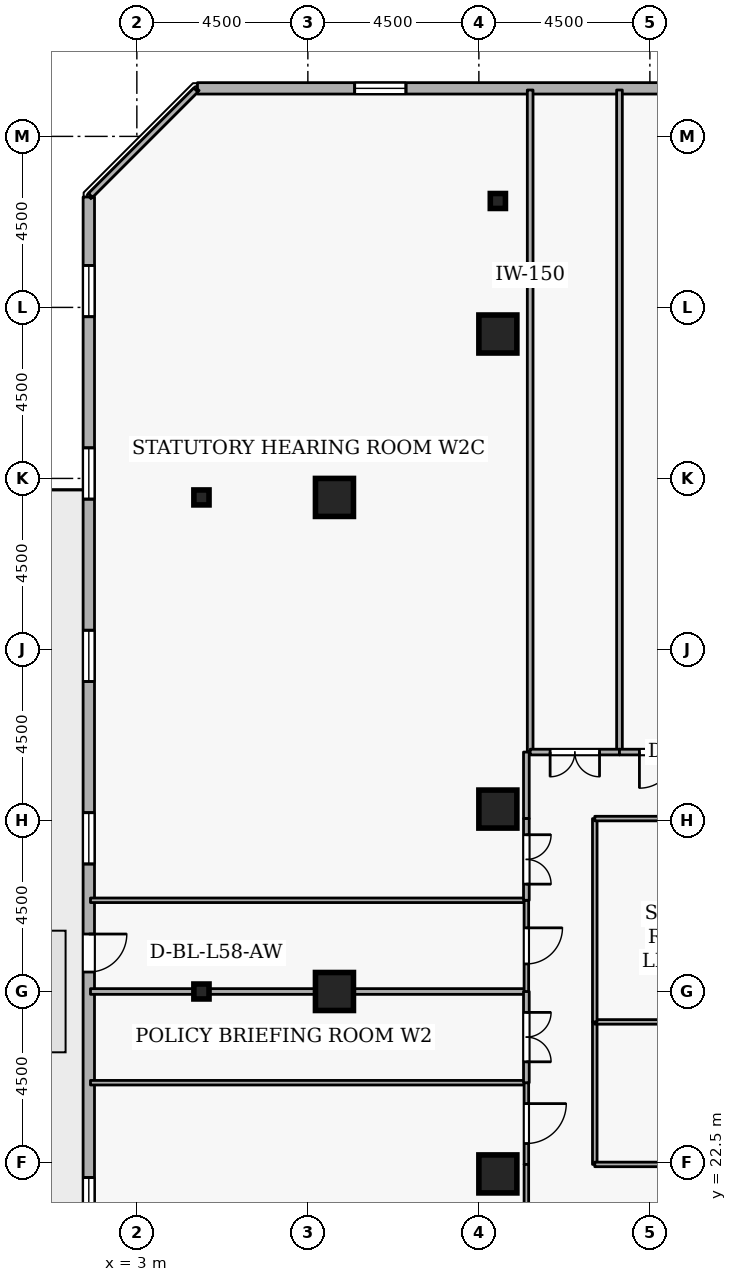
"""IFC4 building model, lengths in metres.
Left out: names, types, materials, properties, quantities, classifications, styles, units other than length and angle.
Written with IfcOpenShell. Run it as: python <this file> out.ifc"""

import sys

from ifc_helpers import new_model, si_unit, direction, frame, frame_2d, origin, origin_2d, place, context, subcontext, project, spatial, rectangle, i_section, extrude, element, fill, save


model = new_model("IFC4")
c1 = context("Model", 3, precision=1e-05, world=origin(), true_north=direction((0.0, 1.0)))
c2 = subcontext(c1, "Body", "Model", "MODEL_VIEW")
j1 = project(units=[si_unit("LENGTHUNIT", "METRE"), si_unit("PLANEANGLEUNIT", "RADIAN")], contexts=[c1])
p1 = place(None, origin())
s1 = spatial("IfcSite", under=j1, at=p1, CompositionType="ELEMENT")
p2 = place(p1, origin())
s2 = spatial("IfcBuilding", under=s1, at=p2, CompositionType="ELEMENT")
p3 = place(p2, frame((0.0, 0.0, 218.1)))
s3 = spatial("IfcBuildingStorey", under=s2, at=p3, CompositionType="ELEMENT", Elevation=218.1)
for number, where, z_axis, x_axis in (
    (1, (12.5, 44.3, 0.0), (0.0, 0.0, 1.0), (1.0, 0.0, 0.0)),
    (2, (8.2, 27.0, 0.0), (0.0, 0.0, 1.0), (1.0, 0.0, 0.0)),
    (3, (8.2, 40.0, 0.0), (0.0, 0.0, 1.0), (1.0, 0.0, 0.0)),
    (4, (12.5, 22.2, 0.0), (0.0, 0.0, 1.0), (1.0, 0.0, 0.0)),
    (5, (12.5, 31.8, 0.0), (0.0, 0.0, 1.0), (1.0, 0.0, 0.0)),
):
    element("IfcColumn", number, at=place(p3, frame(where, z_axis=z_axis, x_axis=x_axis)), inside=s3, PredefinedType="COLUMN", context=c2, shape_type="SweptSolid", body=[
        extrude(rectangle(XDim=1.0, YDim=1.0, at=origin_2d()), origin(), (0.0, 0.0, 1.0), 3.6),
    ])
for number, where, z_axis, x_axis in (
    (6, (12.5, 47.8, 0.0), (0.0, 0.0, 1.0), (1.0, 0.0, 0.0)),
    (7, (4.7, 27.0, 0.0), (0.0, 0.0, 1.0), (1.0, 0.0, 0.0)),
    (8, (4.7, 40.0, 0.0), (0.0, 0.0, 1.0), (1.0, 0.0, 0.0)),
):
    element("IfcColumn", number, at=place(p3, frame(where, z_axis=z_axis, x_axis=x_axis)), inside=s3, PredefinedType="COLUMN", context=c2, shape_type="SweptSolid", body=[
        extrude(i_section(OverallWidth=0.399, OverallDepth=0.394, WebThickness=0.023, FlangeThickness=0.037, FilletRadius=0.015, at=origin_2d()), origin(), (0.0, 0.0, 1.0), 3.6),
    ])
p4 = place(p3, frame((40.681, 50.765, 0.0), z_axis=(0.0, 0.0, 1.0), x_axis=(-0.999999999634, -2.7061402e-05, 0.0)))
e9 = element("IfcWall", 9, at=p4, inside=s3, PredefinedType="STANDARD", context=c2, shape_type="SweptSolid", body=[
    extrude(rectangle(XDim=36.087, YDim=0.3, at=frame_2d((18.043, 0.0))), origin(), (0.0, 0.0, 1.0), 2.66),
])
p5 = place(p4, frame((1.8, 0.0, 0.72)))
e10 = element("IfcOpeningElement", 10, at=p5, cuts=e9, PredefinedType="OPENING", context=c2, shape_type="SweptSolid", body=[
    extrude(rectangle(XDim=1.35, YDim=1.05, at=frame_2d((0.675, 0.525))), frame((0.0, 0.16, 0.0), z_axis=(0.0, -1.0, 0.0), x_axis=(1.0, 0.0, 0.0)), (0.0, 0.0, 1.0), 0.32),
])
p6 = place(p4, frame((6.6, 0.0, 0.72)))
e11 = element("IfcOpeningElement", 11, at=p6, cuts=e9, PredefinedType="OPENING", context=c2, shape_type="SweptSolid", body=[
    extrude(rectangle(XDim=1.35, YDim=1.05, at=frame_2d((0.675, 0.525))), frame((0.0, 0.16, 0.0), z_axis=(0.0, -1.0, 0.0), x_axis=(1.0, 0.0, 0.0)), (0.0, 0.0, 1.0), 0.32),
])
p7 = place(p4, frame((11.4, 0.0, 0.72)))
e12 = element("IfcOpeningElement", 12, at=p7, cuts=e9, PredefinedType="OPENING", context=c2, shape_type="SweptSolid", body=[
    extrude(rectangle(XDim=1.35, YDim=1.05, at=frame_2d((0.675, 0.525))), frame((0.0, 0.16, 0.0), z_axis=(0.0, -1.0, 0.0), x_axis=(1.0, 0.0, 0.0)), (0.0, 0.0, 1.0), 0.32),
])
p8 = place(p4, frame((16.2, 0.0, 0.72)))
e13 = element("IfcOpeningElement", 13, at=p8, cuts=e9, PredefinedType="OPENING", context=c2, shape_type="SweptSolid", body=[
    extrude(rectangle(XDim=1.35, YDim=1.05, at=frame_2d((0.675, 0.525))), frame((0.0, 0.16, 0.0), z_axis=(0.0, -1.0, 0.0), x_axis=(1.0, 0.0, 0.0)), (0.0, 0.0, 1.0), 0.32),
])
p9 = place(p4, frame((21.0, 0.0, 0.72)))
e14 = element("IfcOpeningElement", 14, at=p9, cuts=e9, PredefinedType="OPENING", context=c2, shape_type="SweptSolid", body=[
    extrude(rectangle(XDim=1.35, YDim=1.05, at=frame_2d((0.675, 0.525))), frame((0.0, 0.16, 0.0), z_axis=(0.0, -1.0, 0.0), x_axis=(1.0, 0.0, 0.0)), (0.0, 0.0, 1.0), 0.32),
])
p10 = place(p4, frame((30.6, 0.0, 0.72)))
e15 = element("IfcOpeningElement", 15, at=p10, cuts=e9, PredefinedType="OPENING", context=c2, shape_type="SweptSolid", body=[
    extrude(rectangle(XDim=1.35, YDim=1.05, at=frame_2d((0.675, 0.525))), frame((0.0, 0.16, 0.0), z_axis=(0.0, -1.0, 0.0), x_axis=(1.0, 0.0, 0.0)), (0.0, 0.0, 1.0), 0.32),
])
p11 = place(p3, frame((1.736, 47.906, 0.0), z_axis=(0.0, 0.0, 1.0), x_axis=(-2.7061402e-05, -0.999999999634, 0.0)))
e16 = element("IfcWall", 16, at=p11, inside=s3, PredefinedType="STANDARD", context=c2, shape_type="SweptSolid", body=[
    extrude(rectangle(XDim=36.087, YDim=0.3, at=frame_2d((18.043, 0.0))), origin(), (0.0, 0.0, 1.0), 2.66),
])
p12 = place(p11, frame((19.393, 0.0, 0.0)))
e17 = element("IfcOpeningElement", 17, at=p12, cuts=e16, PredefinedType="OPENING", context=c2, shape_type="SweptSolid", body=[
    extrude(rectangle(XDim=1.0, YDim=2.08, at=frame_2d((0.5, 1.04))), frame((0.0, 0.16, 0.0), z_axis=(0.0, -1.0, 0.0), x_axis=(1.0, 0.0, 0.0)), (0.0, 0.0, 1.0), 0.32),
])
p13 = place(p11, frame((1.8, 0.0, 0.72)))
e18 = element("IfcOpeningElement", 18, at=p13, cuts=e16, PredefinedType="OPENING", context=c2, shape_type="SweptSolid", body=[
    extrude(rectangle(XDim=1.35, YDim=1.05, at=frame_2d((0.675, 0.525))), frame((0.0, 0.16, 0.0), z_axis=(0.0, -1.0, 0.0), x_axis=(1.0, 0.0, 0.0)), (0.0, 0.0, 1.0), 0.32),
])
p14 = place(p11, frame((6.6, 0.0, 0.72)))
e19 = element("IfcOpeningElement", 19, at=p14, cuts=e16, PredefinedType="OPENING", context=c2, shape_type="SweptSolid", body=[
    extrude(rectangle(XDim=1.35, YDim=1.05, at=frame_2d((0.675, 0.525))), frame((0.0, 0.16, 0.0), z_axis=(0.0, -1.0, 0.0), x_axis=(1.0, 0.0, 0.0)), (0.0, 0.0, 1.0), 0.32),
])
p15 = place(p11, frame((11.4, 0.0, 0.72)))
e20 = element("IfcOpeningElement", 20, at=p15, cuts=e16, PredefinedType="OPENING", context=c2, shape_type="SweptSolid", body=[
    extrude(rectangle(XDim=1.35, YDim=1.05, at=frame_2d((0.675, 0.525))), frame((0.0, 0.16, 0.0), z_axis=(0.0, -1.0, 0.0), x_axis=(1.0, 0.0, 0.0)), (0.0, 0.0, 1.0), 0.32),
])
p16 = place(p11, frame((16.2, 0.0, 0.72)))
e21 = element("IfcOpeningElement", 21, at=p16, cuts=e16, PredefinedType="OPENING", context=c2, shape_type="SweptSolid", body=[
    extrude(rectangle(XDim=1.35, YDim=1.05, at=frame_2d((0.675, 0.525))), frame((0.0, 0.16, 0.0), z_axis=(0.0, -1.0, 0.0), x_axis=(1.0, 0.0, 0.0)), (0.0, 0.0, 1.0), 0.32),
])
p17 = place(p11, frame((25.8, 0.0, 0.72)))
e22 = element("IfcOpeningElement", 22, at=p17, cuts=e16, PredefinedType="OPENING", context=c2, shape_type="SweptSolid", body=[
    extrude(rectangle(XDim=1.35, YDim=1.05, at=frame_2d((0.675, 0.525))), frame((0.0, 0.16, 0.0), z_axis=(0.0, -1.0, 0.0), x_axis=(1.0, 0.0, 0.0)), (0.0, 0.0, 1.0), 0.32),
])
p18 = place(p11, frame((30.6, 0.0, 0.72)))
e23 = element("IfcOpeningElement", 23, at=p18, cuts=e16, PredefinedType="OPENING", context=c2, shape_type="SweptSolid", body=[
    extrude(rectangle(XDim=1.35, YDim=1.05, at=frame_2d((0.675, 0.525))), frame((0.0, 0.16, 0.0), z_axis=(0.0, -1.0, 0.0), x_axis=(1.0, 0.0, 0.0)), (0.0, 0.0, 1.0), 0.32),
])
for number, where, z_axis, x_axis in (
    (24, (13.35, 33.3, 0.0), (0.0, 0.0, 1.0), (0.0, 1.0, 0.0)),
    (25, (15.7, 50.72, 0.0), (0.0, 0.0, 1.0), (0.0, -1.0, 0.0)),
):
    element("IfcWall", number, at=place(p3, frame(where, z_axis=z_axis, x_axis=x_axis)), inside=s3, PredefinedType="PARTITIONING", context=c2, shape_type="SweptSolid", body=[
        extrude(rectangle(XDim=17.42, YDim=0.15, at=frame_2d((8.71, 0.0))), origin(), (0.0, 0.0, 1.0), 3.26),
    ])
p19 = place(p3, frame((15.7, 33.3, 0.0), z_axis=(0.0, 0.0, 1.0), x_axis=(-1.0, 0.0, 0.0)))
e26 = element("IfcWall", 26, at=p19, inside=s3, PredefinedType="PARTITIONING", context=c2, shape_type="SweptSolid", body=[
    extrude(rectangle(XDim=2.35, YDim=0.15, at=frame_2d((1.175, 0.0))), origin(), (0.0, 0.0, 1.0), 3.26),
])
p20 = place(p19, frame((0.525, 0.0, 0.0)))
e27 = element("IfcOpeningElement", 27, at=p20, cuts=e26, PredefinedType="OPENING", context=c2, shape_type="SweptSolid", body=[
    extrude(rectangle(XDim=1.3, YDim=2.12, at=frame_2d((0.65, 1.06))), frame((0.0, 0.085, 0.0), z_axis=(0.0, -1.0, 0.0), x_axis=(1.0, 0.0, 0.0)), (0.0, 0.0, 1.0), 0.17),
])
p21 = place(p3, frame((17.7, 33.3, 0.0), z_axis=(0.0, 0.0, 1.0), x_axis=(-1.0, 0.0, 0.0)))
e28 = element("IfcWall", 28, at=p21, inside=s3, PredefinedType="PARTITIONING", context=c2, shape_type="SweptSolid", body=[
    extrude(rectangle(XDim=2.0, YDim=0.15, at=frame_2d((1.0, 0.0))), origin(), (0.0, 0.0, 1.0), 3.26),
])
p22 = place(p21, frame((0.525, 0.0, 0.0)))
e29 = element("IfcOpeningElement", 29, at=p22, cuts=e28, PredefinedType="OPENING", context=c2, shape_type="SweptSolid", body=[
    extrude(rectangle(XDim=0.95, YDim=2.1, at=frame_2d((0.475, 1.05))), frame((0.0, 0.085, 0.0), z_axis=(0.0, -1.0, 0.0), x_axis=(1.0, 0.0, 0.0)), (0.0, 0.0, 1.0), 0.17),
])
p23 = place(p3, frame((1.78, 24.6, 0.0), z_axis=(0.0, 0.0, 1.0), x_axis=(1.0, 0.0, 0.0)))
e30 = element("IfcWall", 30, at=p23, inside=s3, PredefinedType="PARTITIONING", context=c2, shape_type="SweptSolid", body=[
    extrude(rectangle(XDim=11.47, YDim=0.12, at=frame_2d((5.735, 0.0))), origin(), (0.0, 0.0, 1.0), 3.26),
])
p24 = place(p3, frame((13.25, 24.6, 0.0), z_axis=(0.0, 0.0, 1.0), x_axis=(0.0, -1.0, 0.0)))
e31 = element("IfcWall", 31, at=p24, inside=s3, PredefinedType="PARTITIONING", context=c2, shape_type="SweptSolid", body=[
    extrude(rectangle(XDim=2.15, YDim=0.12, at=frame_2d((1.075, 0.0))), origin(), (0.0, 0.0, 1.0), 3.26),
])
p25 = place(p24, frame((0.55, 0.0, 0.0)))
e32 = element("IfcOpeningElement", 32, at=p25, cuts=e31, PredefinedType="OPENING", context=c2, shape_type="SweptSolid", body=[
    extrude(rectangle(XDim=1.05, YDim=2.1, at=frame_2d((0.525, 1.05))), frame((0.0, 0.07, 0.0), z_axis=(0.0, -1.0, 0.0), x_axis=(1.0, 0.0, 0.0)), (0.0, 0.0, 1.0), 0.14),
])
p26 = place(p3, frame((13.25, 22.45, 0.0), z_axis=(0.0, 0.0, 1.0), x_axis=(0.0, -1.0, 0.0)))
e33 = element("IfcWall", 33, at=p26, inside=s3, PredefinedType="PARTITIONING", context=c2, shape_type="SweptSolid", body=[
    extrude(rectangle(XDim=1.75, YDim=0.12, at=frame_2d((0.875, 0.0))), origin(), (0.0, 0.0, 1.0), 3.26),
])
p27 = place(p3, frame((1.78, 27.0, 0.0), z_axis=(0.0, 0.0, 1.0), x_axis=(1.0, 0.0, 0.0)))
e34 = element("IfcWall", 34, at=p27, inside=s3, PredefinedType="PARTITIONING", context=c2, shape_type="SweptSolid", body=[
    extrude(rectangle(XDim=11.47, YDim=0.15, at=frame_2d((5.735, 0.0))), origin(), (0.0, 0.0, 1.0), 2.802),
])
p28 = place(p3, frame((13.25, 27.0, 0.0), z_axis=(0.0, 0.0, 1.0), x_axis=(0.0, -1.0, 0.0)))
e35 = element("IfcWall", 35, at=p28, inside=s3, PredefinedType="PARTITIONING", context=c2, shape_type="SweptSolid", body=[
    extrude(rectangle(XDim=2.4, YDim=0.15, at=frame_2d((1.2, 0.0))), origin(), (0.0, 0.0, 1.0), 3.26),
])
p29 = place(p28, frame((0.55, 0.0, 0.0)))
e36 = element("IfcOpeningElement", 36, at=p29, cuts=e35, PredefinedType="OPENING", context=c2, shape_type="SweptSolid", body=[
    extrude(rectangle(XDim=1.3, YDim=2.12, at=frame_2d((0.65, 1.06))), frame((0.0, 0.085, 0.0), z_axis=(0.0, -1.0, 0.0), x_axis=(1.0, 0.0, 0.0)), (0.0, 0.0, 1.0), 0.17),
])
p30 = place(p3, frame((1.78, 29.4, 0.0), z_axis=(0.0, 0.0, 1.0), x_axis=(1.0, 0.0, 0.0)))
e37 = element("IfcWall", 37, at=p30, inside=s3, PredefinedType="PARTITIONING", context=c2, shape_type="SweptSolid", body=[
    extrude(rectangle(XDim=11.47, YDim=0.12, at=frame_2d((5.735, 0.0))), origin(), (0.0, 0.0, 1.0), 3.26),
])
p31 = place(p3, frame((13.25, 29.4, 0.0), z_axis=(0.0, 0.0, 1.0), x_axis=(0.0, -1.0, 0.0)))
e38 = element("IfcWall", 38, at=p31, inside=s3, PredefinedType="PARTITIONING", context=c2, shape_type="SweptSolid", body=[
    extrude(rectangle(XDim=2.4, YDim=0.12, at=frame_2d((1.2, 0.0))), origin(), (0.0, 0.0, 1.0), 3.26),
])
p32 = place(p31, frame((0.725, 0.0, 0.0)))
e39 = element("IfcOpeningElement", 39, at=p32, cuts=e38, PredefinedType="OPENING", context=c2, shape_type="SweptSolid", body=[
    extrude(rectangle(XDim=0.95, YDim=2.1, at=frame_2d((0.475, 1.05))), frame((0.0, 0.07, 0.0), z_axis=(0.0, -1.0, 0.0), x_axis=(1.0, 0.0, 0.0)), (0.0, 0.0, 1.0), 0.14),
])
p33 = place(p3, frame((1.78, 47.948, 0.0), z_axis=(0.0, 0.0, 1.0), x_axis=(0.707106781187, 0.707106781187, 0.0)))
e40 = element("IfcWall", 40, at=p33, inside=s3, PredefinedType="PARTITIONING", context=c2, shape_type="SweptSolid", body=[
    extrude(rectangle(XDim=3.919, YDim=0.15, at=frame_2d((1.96, 0.0))), origin(), (0.0, 0.0, 1.0), 3.26),
])
p34 = place(p3, frame((13.25, 33.3, 0.0), z_axis=(0.0, 0.0, 1.0), x_axis=(0.0, -1.0, 0.0)))
e41 = element("IfcWall", 41, at=p34, inside=s3, PredefinedType="PARTITIONING", context=c2, shape_type="SweptSolid", body=[
    extrude(rectangle(XDim=1.75, YDim=0.15, at=frame_2d((0.875, 0.0))), origin(), (0.0, 0.0, 1.0), 3.26),
])
p35 = place(p3, frame((13.25, 31.55, 0.0), z_axis=(0.0, 0.0, 1.0), x_axis=(0.0, -1.0, 0.0)))
e42 = element("IfcWall", 42, at=p35, inside=s3, PredefinedType="PARTITIONING", context=c2, shape_type="SweptSolid", body=[
    extrude(rectangle(XDim=2.15, YDim=0.15, at=frame_2d((1.075, 0.0))), origin(), (0.0, 0.0, 1.0), 3.26),
])
p36 = place(p35, frame((0.425, 0.0, 0.0)))
e43 = element("IfcOpeningElement", 43, at=p36, cuts=e42, PredefinedType="OPENING", context=c2, shape_type="SweptSolid", body=[
    extrude(rectangle(XDim=1.3, YDim=2.12, at=frame_2d((0.65, 1.06))), frame((0.0, 0.085, 0.0), z_axis=(0.0, -1.0, 0.0), x_axis=(1.0, 0.0, 0.0)), (0.0, 0.0, 1.0), 0.17),
])
p37 = place(p3, frame((15.05, 22.45, 0.0), z_axis=(0.0, 0.0, 1.0), x_axis=(0.0, 1.0, 0.0)))
e44 = element("IfcWall", 44, at=p37, inside=s3, PredefinedType="PARTITIONING", context=c2, shape_type="SweptSolid", body=[
    extrude(rectangle(XDim=3.75, YDim=0.12, at=frame_2d((1.875, 0.0))), origin(), (0.0, 0.0, 1.0), 3.26),
])
p38 = place(p3, frame((15.05, 26.2, 0.0), z_axis=(0.0, 0.0, 1.0), x_axis=(1.0, 0.0, 0.0)))
e45 = element("IfcWall", 45, at=p38, inside=s3, PredefinedType="PARTITIONING", context=c2, shape_type="SweptSolid", body=[
    extrude(rectangle(XDim=5.85, YDim=0.12, at=frame_2d((2.925, 0.0))), origin(), (0.0, 0.0, 1.0), 3.26),
])
p39 = place(p3, frame((20.9, 22.45, 0.0), z_axis=(0.0, 0.0, 1.0), x_axis=(-1.0, 0.0, 0.0)))
e46 = element("IfcWall", 46, at=p39, inside=s3, PredefinedType="PARTITIONING", context=c2, shape_type="SweptSolid", body=[
    extrude(rectangle(XDim=5.85, YDim=0.12, at=frame_2d((2.925, 0.0))), origin(), (0.0, 0.0, 1.0), 3.26),
])
p40 = place(p39, frame((2.45, 0.0, 0.0)))
e47 = element("IfcOpeningElement", 47, at=p40, cuts=e46, PredefinedType="OPENING", context=c2, shape_type="SweptSolid", body=[
    extrude(rectangle(XDim=0.95, YDim=2.1, at=frame_2d((0.475, 1.05))), frame((0.0, 0.07, 0.0), z_axis=(0.0, -1.0, 0.0), x_axis=(1.0, 0.0, 0.0)), (0.0, 0.0, 1.0), 0.14),
])
p41 = place(p3, frame((15.05, 26.2, 0.0), z_axis=(0.0, 0.0, 1.0), x_axis=(0.0, 1.0, 0.0)))
e48 = element("IfcWall", 48, at=p41, inside=s3, PredefinedType="PARTITIONING", context=c2, shape_type="SweptSolid", body=[
    extrude(rectangle(XDim=5.35, YDim=0.12, at=frame_2d((2.675, 0.0))), origin(), (0.0, 0.0, 1.0), 3.26),
])
p42 = place(p3, frame((15.05, 31.55, 0.0), z_axis=(0.0, 0.0, 1.0), x_axis=(1.0, 0.0, 0.0)))
e49 = element("IfcWall", 49, at=p42, inside=s3, PredefinedType="PARTITIONING", context=c2, shape_type="SweptSolid", body=[
    extrude(rectangle(XDim=5.85, YDim=0.12, at=frame_2d((2.925, 0.0))), origin(), (0.0, 0.0, 1.0), 3.26),
])
p43 = place(p42, frame((2.45, 0.0, 0.0)))
e50 = element("IfcOpeningElement", 50, at=p43, cuts=e49, PredefinedType="OPENING", context=c2, shape_type="SweptSolid", body=[
    extrude(rectangle(XDim=0.95, YDim=2.1, at=frame_2d((0.475, 1.05))), frame((0.0, 0.07, 0.0), z_axis=(0.0, -1.0, 0.0), x_axis=(1.0, 0.0, 0.0)), (0.0, 0.0, 1.0), 0.14),
])
p44 = place(p10, origin())
e51 = element("IfcWindow", 51, at=p44, inside=s3, PartitioningType="SINGLE_PANEL", PredefinedType="WINDOW", context=c2, shape_type="SweptSolid", body=[
    extrude(rectangle(XDim=1.35, YDim=1.05, at=frame_2d((0.675, 0.525))), frame((0.0, 0.03, 0.0), z_axis=(0.0, -1.0, 0.0), x_axis=(1.0, 0.0, 0.0)), (0.0, 0.0, 1.0), 0.06),
])
fill(e15, e51)
p45 = place(p12, origin())
e52 = element("IfcDoor", 52, at=p45, inside=s3, OperationType="SINGLE_SWING_LEFT", PredefinedType="DOOR", context=c2, shape_type="SweptSolid", body=[
    extrude(rectangle(XDim=1.0, YDim=2.08, at=frame_2d((0.5, 1.04))), frame((0.0, 0.025, 0.0), z_axis=(0.0, -1.0, 0.0), x_axis=(1.0, 0.0, 0.0)), (0.0, 0.0, 1.0), 0.05),
])
fill(e17, e52)
p46 = place(p13, origin())
e53 = element("IfcWindow", 53, at=p46, inside=s3, PartitioningType="SINGLE_PANEL", PredefinedType="WINDOW", context=c2, shape_type="SweptSolid", body=[
    extrude(rectangle(XDim=1.35, YDim=1.05, at=frame_2d((0.675, 0.525))), frame((0.0, 0.03, 0.0), z_axis=(0.0, -1.0, 0.0), x_axis=(1.0, 0.0, 0.0)), (0.0, 0.0, 1.0), 0.06),
])
fill(e18, e53)
p47 = place(p14, origin())
e54 = element("IfcWindow", 54, at=p47, inside=s3, PartitioningType="SINGLE_PANEL", PredefinedType="WINDOW", context=c2, shape_type="SweptSolid", body=[
    extrude(rectangle(XDim=1.35, YDim=1.05, at=frame_2d((0.675, 0.525))), frame((0.0, 0.03, 0.0), z_axis=(0.0, -1.0, 0.0), x_axis=(1.0, 0.0, 0.0)), (0.0, 0.0, 1.0), 0.06),
])
fill(e19, e54)
p48 = place(p15, origin())
e55 = element("IfcWindow", 55, at=p48, inside=s3, PartitioningType="SINGLE_PANEL", PredefinedType="WINDOW", context=c2, shape_type="SweptSolid", body=[
    extrude(rectangle(XDim=1.35, YDim=1.05, at=frame_2d((0.675, 0.525))), frame((0.0, 0.03, 0.0), z_axis=(0.0, -1.0, 0.0), x_axis=(1.0, 0.0, 0.0)), (0.0, 0.0, 1.0), 0.06),
])
fill(e20, e55)
p49 = place(p16, origin())
e56 = element("IfcWindow", 56, at=p49, inside=s3, PartitioningType="SINGLE_PANEL", PredefinedType="WINDOW", context=c2, shape_type="SweptSolid", body=[
    extrude(rectangle(XDim=1.35, YDim=1.05, at=frame_2d((0.675, 0.525))), frame((0.0, 0.03, 0.0), z_axis=(0.0, -1.0, 0.0), x_axis=(1.0, 0.0, 0.0)), (0.0, 0.0, 1.0), 0.06),
])
fill(e21, e56)
p50 = place(p17, origin())
e57 = element("IfcWindow", 57, at=p50, inside=s3, PartitioningType="SINGLE_PANEL", PredefinedType="WINDOW", context=c2, shape_type="SweptSolid", body=[
    extrude(rectangle(XDim=1.35, YDim=1.05, at=frame_2d((0.675, 0.525))), frame((0.0, 0.03, 0.0), z_axis=(0.0, -1.0, 0.0), x_axis=(1.0, 0.0, 0.0)), (0.0, 0.0, 1.0), 0.06),
])
fill(e22, e57)
p51 = place(p20, origin())
e58 = element("IfcDoor", 58, at=p51, inside=s3, OperationType="DOUBLE_DOOR_SINGLE_SWING", PredefinedType="DOOR", context=c2, shape_type="SweptSolid", body=[
    extrude(rectangle(XDim=1.3, YDim=2.12, at=frame_2d((0.65, 1.06))), frame((0.0, 0.025, 0.0), z_axis=(0.0, -1.0, 0.0), x_axis=(1.0, 0.0, 0.0)), (0.0, 0.0, 1.0), 0.05),
])
fill(e27, e58)
p52 = place(p22, origin())
e59 = element("IfcDoor", 59, at=p52, inside=s3, OperationType="SINGLE_SWING_RIGHT", PredefinedType="DOOR", context=c2, shape_type="SweptSolid", body=[
    extrude(rectangle(XDim=0.95, YDim=2.1, at=frame_2d((0.475, 1.05))), frame((0.0, 0.025, 0.0), z_axis=(0.0, -1.0, 0.0), x_axis=(1.0, 0.0, 0.0)), (0.0, 0.0, 1.0), 0.05),
])
fill(e29, e59)
p53 = place(p25, origin())
e60 = element("IfcDoor", 60, at=p53, inside=s3, OperationType="SINGLE_SWING_LEFT", PredefinedType="DOOR", context=c2, shape_type="SweptSolid", body=[
    extrude(rectangle(XDim=1.05, YDim=2.1, at=frame_2d((0.525, 1.05))), frame((0.0, 0.025, 0.0), z_axis=(0.0, -1.0, 0.0), x_axis=(1.0, 0.0, 0.0)), (0.0, 0.0, 1.0), 0.05),
])
fill(e32, e60)
p54 = place(p29, origin())
e61 = element("IfcDoor", 61, at=p54, inside=s3, OperationType="DOUBLE_DOOR_SINGLE_SWING", PredefinedType="DOOR", context=c2, shape_type="SweptSolid", body=[
    extrude(rectangle(XDim=1.3, YDim=2.12, at=frame_2d((0.65, 1.06))), frame((0.0, 0.025, 0.0), z_axis=(0.0, -1.0, 0.0), x_axis=(1.0, 0.0, 0.0)), (0.0, 0.0, 1.0), 0.05),
])
fill(e36, e61)
p55 = place(p32, origin())
e62 = element("IfcDoor", 62, at=p55, inside=s3, OperationType="SINGLE_SWING_LEFT", PredefinedType="DOOR", context=c2, shape_type="SweptSolid", body=[
    extrude(rectangle(XDim=0.95, YDim=2.1, at=frame_2d((0.475, 1.05))), frame((0.0, 0.025, 0.0), z_axis=(0.0, -1.0, 0.0), x_axis=(1.0, 0.0, 0.0)), (0.0, 0.0, 1.0), 0.05),
])
fill(e39, e62)
p56 = place(p36, origin())
e63 = element("IfcDoor", 63, at=p56, inside=s3, OperationType="DOUBLE_DOOR_SINGLE_SWING", PredefinedType="DOOR", context=c2, shape_type="SweptSolid", body=[
    extrude(rectangle(XDim=1.3, YDim=2.12, at=frame_2d((0.65, 1.06))), frame((0.0, 0.025, 0.0), z_axis=(0.0, -1.0, 0.0), x_axis=(1.0, 0.0, 0.0)), (0.0, 0.0, 1.0), 0.05),
])
fill(e43, e63)
save(model, sys.argv[1])
